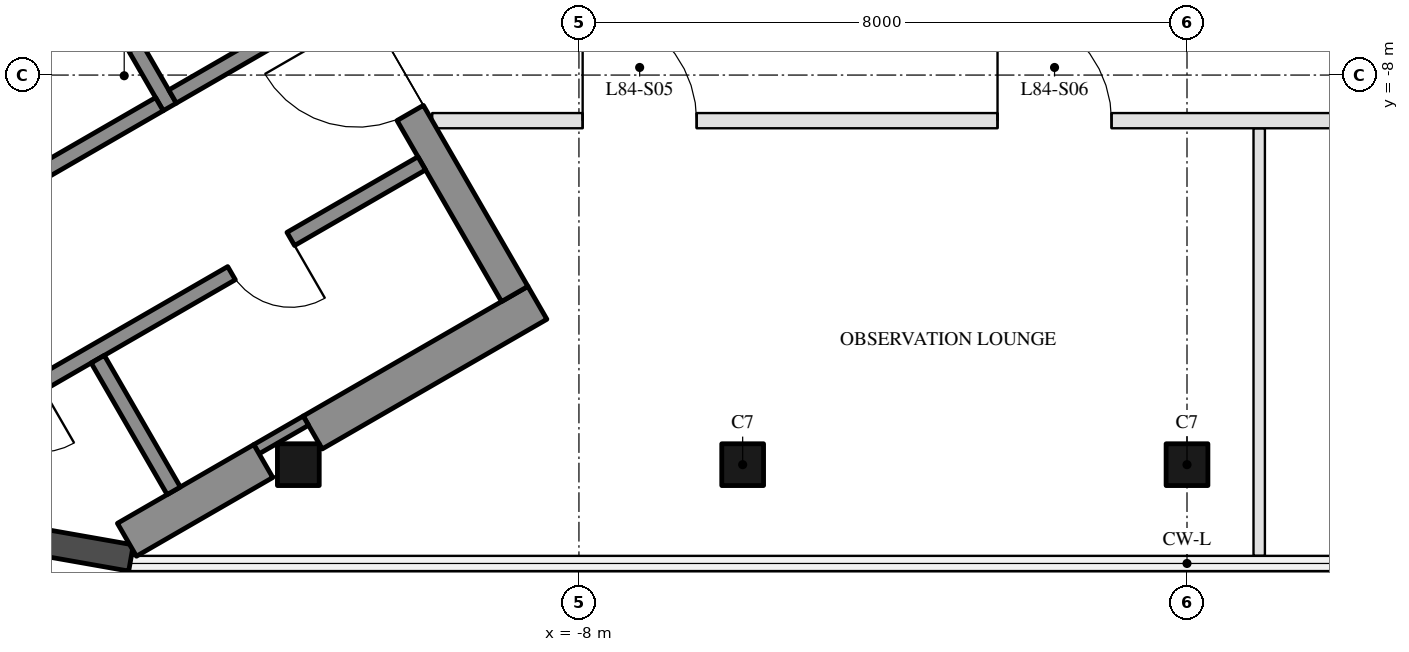
"""IFC4 building model, lengths in metres.
Left out: names, types, materials, properties, quantities, classifications, styles, units other than length and angle.
Written with IfcOpenShell. Run it as: python <this file> out.ifc"""

import sys

from ifc_helpers import new_model, si_unit, direction, frame, frame_2d, origin, origin_2d, place, context, subcontext, project, spatial, rectangle, hollow_rectangle, extrude, boolean, halfspace, element, fill, save


model = new_model("IFC4")
c1 = context("Model", 3, precision=1e-05, world=origin(), true_north=direction((0.0, 1.0)))
c2 = subcontext(c1, "Body", "Model", "MODEL_VIEW")
j1 = project(units=[si_unit("LENGTHUNIT", "METRE"), si_unit("PLANEANGLEUNIT", "RADIAN")], contexts=[c1])
p1 = place(None, origin())
s1 = spatial("IfcSite", under=j1, at=p1, CompositionType="ELEMENT")
p2 = place(p1, origin())
s2 = spatial("IfcBuilding", under=s1, at=p2, CompositionType="ELEMENT")
p3 = place(p2, frame((0.0, 0.0, 338.3)))
s3 = spatial("IfcBuildingStorey", under=s2, at=p3, CompositionType="ELEMENT", Elevation=338.3)
p4 = place(p3, frame((-11.692, -13.126, 0.0), z_axis=(0.0, 0.0, 1.0), x_axis=(-1.0, 0.0, 0.0)))
e1 = element("IfcColumn", 1, at=p4, inside=s3, PredefinedType="COLUMN", context=c2, shape_type="SweptSolid", body=[
    boolean("DIFFERENCE", extrude(hollow_rectangle(XDim=0.55, YDim=0.55, WallThickness=0.025, at=origin_2d()), origin(), (0.0, 0.0, 1.0), 5.0), halfspace(frame((0.0, 0.0, 0.024), z_axis=(0.0, 0.0, 1.0), x_axis=(1.0, 0.0, 0.0)), True)),
])
p5 = place(p3, frame((-5.846, -13.126, 0.0), z_axis=(0.0, 0.0, 1.0), x_axis=(-1.0, 0.0, 0.0)))
e2 = element("IfcColumn", 2, at=p5, inside=s3, PredefinedType="COLUMN", context=c2, shape_type="SweptSolid", body=[
    boolean("DIFFERENCE", extrude(hollow_rectangle(XDim=0.55, YDim=0.55, WallThickness=0.025, at=origin_2d()), origin(), (0.0, 0.0, 1.0), 5.0), halfspace(frame((0.0, 0.0, 0.02), z_axis=(0.0, 0.0, 1.0), x_axis=(1.0, 0.0, 0.0)), True)),
])
p6 = place(p3, frame((0.0, -13.126, 0.0), z_axis=(0.0, 0.0, 1.0), x_axis=(-1.0, 0.0, 0.0)))
e3 = element("IfcColumn", 3, at=p6, inside=s3, PredefinedType="COLUMN", context=c2, shape_type="SweptSolid", body=[
    boolean("DIFFERENCE", extrude(hollow_rectangle(XDim=0.55, YDim=0.55, WallThickness=0.025, at=origin_2d()), origin(), (0.0, 0.0, 1.0), 5.0), halfspace(frame((0.0, 0.0, 0.019), z_axis=(0.0, 0.0, 1.0), x_axis=(1.0, 0.0, 0.0)), True)),
])
p7 = place(p3, frame((-15.285, -14.108, 0.0), z_axis=(0.0, 0.0, 1.0), x_axis=(0.984790512781, -0.173745923511, 0.0)))
e4 = element("IfcWall", 4, at=p7, inside=s3, PredefinedType="SOLIDWALL", context=c2, shape_type="SweptSolid", body=[
    extrude(rectangle(XDim=1.414, YDim=0.35, at=frame_2d((0.707, 0.0))), origin(), (0.0, 0.0, 1.0), 4.8),
])
p8 = place(p3, frame((-8.547, -10.997, 0.0), z_axis=(0.0, 0.0, 1.0), x_axis=(-0.866024775297, -0.500001088571, 0.0)))
e5 = element("IfcWall", 5, at=p8, inside=s3, PredefinedType="SHEAR", context=c2, shape_type="SweptSolid", body=[
    extrude(rectangle(XDim=3.413, YDim=0.5, at=frame_2d((1.707, 0.0))), origin(), (0.0, 0.0, 1.0), 4.8),
])
p9 = place(p3, frame((-11.593, -12.547, 0.0), z_axis=(0.0, 0.0, 1.0), x_axis=(-0.866115239748, -0.499844367254, 0.0)))
e6 = element("IfcWall", 6, at=p9, inside=s3, PredefinedType="SHEAR", context=c2, shape_type="SweptSolid", body=[
    extrude(rectangle(XDim=0.751, YDim=0.14, at=frame_2d((0.375, 0.0))), origin(), (0.0, 0.0, 1.0), 4.8),
])
p10 = place(p3, frame((-12.153, -13.079, 0.0), z_axis=(0.0, 0.0, 1.0), x_axis=(-0.866044274939, -0.499967312778, 0.0)))
e7 = element("IfcWall", 7, at=p10, inside=s3, PredefinedType="SHEAR", context=c2, shape_type="SweptSolid", body=[
    extrude(rectangle(XDim=2.072, YDim=0.5, at=frame_2d((1.036, 0.0))), origin(), (0.0, 0.0, 1.0), 4.8),
])
p11 = place(p3, frame((-13.845, -2.22, 0.0), z_axis=(0.0, 0.0, 1.0), x_axis=(0.500004234368, -0.866022959057, 0.0)))
e8 = element("IfcWall", 8, at=p11, inside=s3, PredefinedType="SHEAR", context=c2, shape_type="SweptSolid", body=[
    extrude(rectangle(XDim=10.0, YDim=0.4, at=frame_2d((5.0, 0.0))), origin(), (0.0, 0.0, 1.0), 4.8),
])
p12 = place(p11, frame((3.55, 0.0, 0.0)))
e9 = element("IfcOpeningElement", 9, at=p12, cuts=e8, PredefinedType="OPENING", context=c2, shape_type="SweptSolid", body=[
    extrude(rectangle(XDim=1.1, YDim=2.1, at=frame_2d((0.55, 1.05))), frame((0.0, 0.21, 0.0), z_axis=(0.0, -1.0, 0.0), x_axis=(1.0, 0.0, 0.0)), (0.0, 0.0, 1.0), 0.42),
])
p13 = place(p11, frame((5.85, 0.0, 0.0)))
e10 = element("IfcOpeningElement", 10, at=p13, cuts=e8, PredefinedType="OPENING", context=c2, shape_type="SweptSolid", body=[
    extrude(rectangle(XDim=1.4, YDim=2.1, at=frame_2d((0.7, 1.05))), frame((0.0, 0.21, 0.0), z_axis=(0.0, -1.0, 0.0), x_axis=(1.0, 0.0, 0.0)), (0.0, 0.0, 1.0), 0.42),
])
p14 = place(p3, frame((-12.681, -4.636, 0.0), z_axis=(0.0, 0.0, 1.0), x_axis=(-0.866021702275, -0.500006411147, 0.0)))
e11 = element("IfcWall", 11, at=p14, inside=s3, PredefinedType="SHEAR", context=c2, shape_type="SweptSolid", body=[
    extrude(rectangle(XDim=6.45, YDim=0.25, at=frame_2d((3.225, 0.0))), origin(), (0.0, 0.0, 1.0), 4.8),
])
p15 = place(p14, frame((0.3, 0.0, 0.0)))
e12 = element("IfcOpeningElement", 12, at=p15, cuts=e11, PredefinedType="OPENING", context=c2, shape_type="SweptSolid", body=[
    extrude(rectangle(XDim=1.0, YDim=2.1, at=frame_2d((0.5, 1.05))), frame((0.0, 0.135, 0.0), z_axis=(0.0, -1.0, 0.0), x_axis=(1.0, 0.0, 0.0)), (0.0, 0.0, 1.0), 0.27),
])
p16 = place(p3, frame((-14.783, -5.995, 0.0), z_axis=(0.0, 0.0, 1.0), x_axis=(0.49994636267, -0.866056369097, 0.0)))
e13 = element("IfcWall", 13, at=p16, inside=s3, PredefinedType="SHEAR", context=c2, shape_type="SweptSolid", body=[
    extrude(rectangle(XDim=2.8, YDim=0.2, at=frame_2d((1.4, 0.0))), origin(), (0.0, 0.0, 1.0), 4.8),
])
p17 = place(p16, frame((0.7, 0.0, 0.0)))
e14 = element("IfcOpeningElement", 14, at=p17, cuts=e13, PredefinedType="OPENING", context=c2, shape_type="SweptSolid", body=[
    extrude(rectangle(XDim=1.2, YDim=2.1, at=frame_2d((0.6, 1.05))), frame((0.0, 0.11, 0.0), z_axis=(0.0, -1.0, 0.0), x_axis=(1.0, 0.0, 0.0)), (0.0, 0.0, 1.0), 0.22),
])
p18 = place(p3, frame((-13.52, -8.383, 0.0), z_axis=(0.0, 0.0, 1.0), x_axis=(-0.866034573852, -0.49998411664, 0.0)))
e15 = element("IfcWall", 15, at=p18, inside=s3, PredefinedType="SHEAR", context=c2, shape_type="SweptSolid", body=[
    extrude(rectangle(XDim=2.8, YDim=0.2, at=frame_2d((1.4, 0.0))), origin(), (0.0, 0.0, 1.0), 4.8),
])
p19 = place(p3, frame((-11.268, -7.083, 0.0), z_axis=(0.0, 0.0, 1.0), x_axis=(-0.866050077142, -0.499957262057, 0.0)))
e16 = element("IfcWall", 16, at=p19, inside=s3, PredefinedType="SHEAR", context=c2, shape_type="SweptSolid", body=[
    extrude(rectangle(XDim=2.4, YDim=0.2, at=frame_2d((1.2, 0.0))), origin(), (0.0, 0.0, 1.0), 4.8),
])
p20 = place(p3, frame((-10.068, -9.162, 0.0), z_axis=(0.0, 0.0, 1.0), x_axis=(-0.86602942914, -0.499993027815, 0.0)))
e17 = element("IfcWall", 17, at=p20, inside=s3, PredefinedType="SHEAR", context=c2, shape_type="SweptSolid", body=[
    extrude(rectangle(XDim=7.576, YDim=0.2, at=frame_2d((3.788, 0.0))), origin(), (0.0, 0.0, 1.0), 4.8),
])
p21 = place(p20, frame((1.99, 0.0, 0.0)))
e18 = element("IfcOpeningElement", 18, at=p21, cuts=e17, PredefinedType="OPENING", context=c2, shape_type="SweptSolid", body=[
    extrude(rectangle(XDim=0.9, YDim=2.1, at=frame_2d((0.45, 1.05))), frame((0.0, 0.11, 0.0), z_axis=(0.0, -1.0, 0.0), x_axis=(1.0, 0.0, 0.0)), (0.0, 0.0, 1.0), 0.22),
])
p22 = place(p20, frame((5.8, 0.0, 0.0)))
e19 = element("IfcOpeningElement", 19, at=p22, cuts=e17, PredefinedType="OPENING", context=c2, shape_type="SweptSolid", body=[
    extrude(rectangle(XDim=0.9, YDim=2.1, at=frame_2d((0.45, 1.05))), frame((0.0, 0.11, 0.0), z_axis=(0.0, -1.0, 0.0), x_axis=(1.0, 0.0, 0.0)), (0.0, 0.0, 1.0), 0.22),
])
p23 = place(p3, frame((-14.331, -11.738, 0.0), z_axis=(0.0, 0.0, 1.0), x_axis=(0.499972520799, -0.866041268327, 0.0)))
e20 = element("IfcWall", 20, at=p23, inside=s3, PredefinedType="SHEAR", context=c2, shape_type="SweptSolid", body=[
    extrude(rectangle(XDim=2.0, YDim=0.2, at=frame_2d((1.0, 0.0))), origin(), (0.0, 0.0, 1.0), 4.8),
])
p24 = place(p3, frame((0.95, -14.326, 0.0), z_axis=(0.0, 0.0, 1.0), x_axis=(0.0, 1.0, 0.0)))
e21 = element("IfcWall", 21, at=p24, inside=s3, PredefinedType="PARTITIONING", context=c2, shape_type="SweptSolid", body=[
    extrude(rectangle(XDim=5.626, YDim=0.15, at=frame_2d((2.813, 0.0))), origin(), (0.0, 0.0, 1.0), 4.41),
])
p25 = place(p3, frame((-9.93, -8.6, 0.0), z_axis=(0.0, 0.0, 1.0), x_axis=(1.0, 0.0, 0.0)))
e22 = element("IfcWall", 22, at=p25, inside=s3, PredefinedType="PARTITIONING", context=c2, shape_type="SweptSolid", body=[
    extrude(rectangle(XDim=19.861, YDim=0.2, at=frame_2d((9.93, 0.0))), origin(), (0.0, 0.0, 1.0), 4.4),
])
p26 = place(p25, frame((1.979, 0.0, 0.0)))
e23 = element("IfcOpeningElement", 23, at=p26, cuts=e22, PredefinedType="OPENING", context=c2, shape_type="SweptSolid", body=[
    extrude(rectangle(XDim=1.5, YDim=2.1, at=frame_2d((0.75, 1.05))), frame((0.0, 0.11, 0.0), z_axis=(0.0, -1.0, 0.0), x_axis=(1.0, 0.0, 0.0)), (0.0, 0.0, 1.0), 0.22),
])
p27 = place(p25, frame((7.438, 0.0, 0.0)))
e24 = element("IfcOpeningElement", 24, at=p27, cuts=e22, PredefinedType="OPENING", context=c2, shape_type="SweptSolid", body=[
    extrude(rectangle(XDim=1.5, YDim=2.1, at=frame_2d((0.75, 1.05))), frame((0.0, 0.11, 0.0), z_axis=(0.0, -1.0, 0.0), x_axis=(1.0, 0.0, 0.0)), (0.0, 0.0, 1.0), 0.22),
])
p28 = place(p25, frame((14.752, 0.0, 0.0)))
e25 = element("IfcOpeningElement", 25, at=p28, cuts=e22, PredefinedType="OPENING", context=c2, shape_type="SweptSolid", body=[
    extrude(rectangle(XDim=1.2, YDim=2.1, at=frame_2d((0.6, 1.05))), frame((0.0, 0.11, 0.0), z_axis=(0.0, -1.0, 0.0), x_axis=(1.0, 0.0, 0.0)), (0.0, 0.0, 1.0), 0.22),
])
p29 = place(p21, origin())
e26 = element("IfcDoor", 26, at=p29, inside=s3, OperationType="SINGLE_SWING_LEFT", PredefinedType="DOOR", context=c2, shape_type="SweptSolid", body=[
    extrude(rectangle(XDim=0.9, YDim=2.1, at=frame_2d((0.45, 1.05))), frame((0.0, 0.025, 0.0), z_axis=(0.0, -1.0, 0.0), x_axis=(1.0, 0.0, 0.0)), (0.0, 0.0, 1.0), 0.05),
])
fill(e18, e26)
p30 = place(p13, frame((1.4, 0.0, 0.0), z_axis=(0.0, 0.0, 1.0), x_axis=(-1.0, 0.0, 0.0)))
e27 = element("IfcDoor", 27, at=p30, inside=s3, OperationType="DOUBLE_DOOR_SINGLE_SWING", PredefinedType="DOOR", context=c2, shape_type="SweptSolid", body=[
    extrude(rectangle(XDim=1.4, YDim=2.1, at=frame_2d((0.7, 1.05))), frame((0.0, 0.025, 0.0), z_axis=(0.0, -1.0, 0.0), x_axis=(1.0, 0.0, 0.0)), (0.0, 0.0, 1.0), 0.05),
])
fill(e10, e27)
p31 = place(p26, origin())
e28 = element("IfcDoor", 28, at=p31, inside=s3, OperationType="DOUBLE_DOOR_SINGLE_SWING", PredefinedType="DOOR", context=c2, shape_type="SweptSolid", body=[
    extrude(rectangle(XDim=1.5, YDim=2.1, at=frame_2d((0.75, 1.05))), frame((0.0, 0.025, 0.0), z_axis=(0.0, -1.0, 0.0), x_axis=(1.0, 0.0, 0.0)), (0.0, 0.0, 1.0), 0.05),
])
fill(e23, e28)
p32 = place(p27, origin())
e29 = element("IfcDoor", 29, at=p32, inside=s3, OperationType="DOUBLE_DOOR_SINGLE_SWING", PredefinedType="DOOR", context=c2, shape_type="SweptSolid", body=[
    extrude(rectangle(XDim=1.5, YDim=2.1, at=frame_2d((0.75, 1.05))), frame((0.0, 0.025, 0.0), z_axis=(0.0, -1.0, 0.0), x_axis=(1.0, 0.0, 0.0)), (0.0, 0.0, 1.0), 0.05),
])
fill(e24, e29)
save(model, sys.argv[1])
